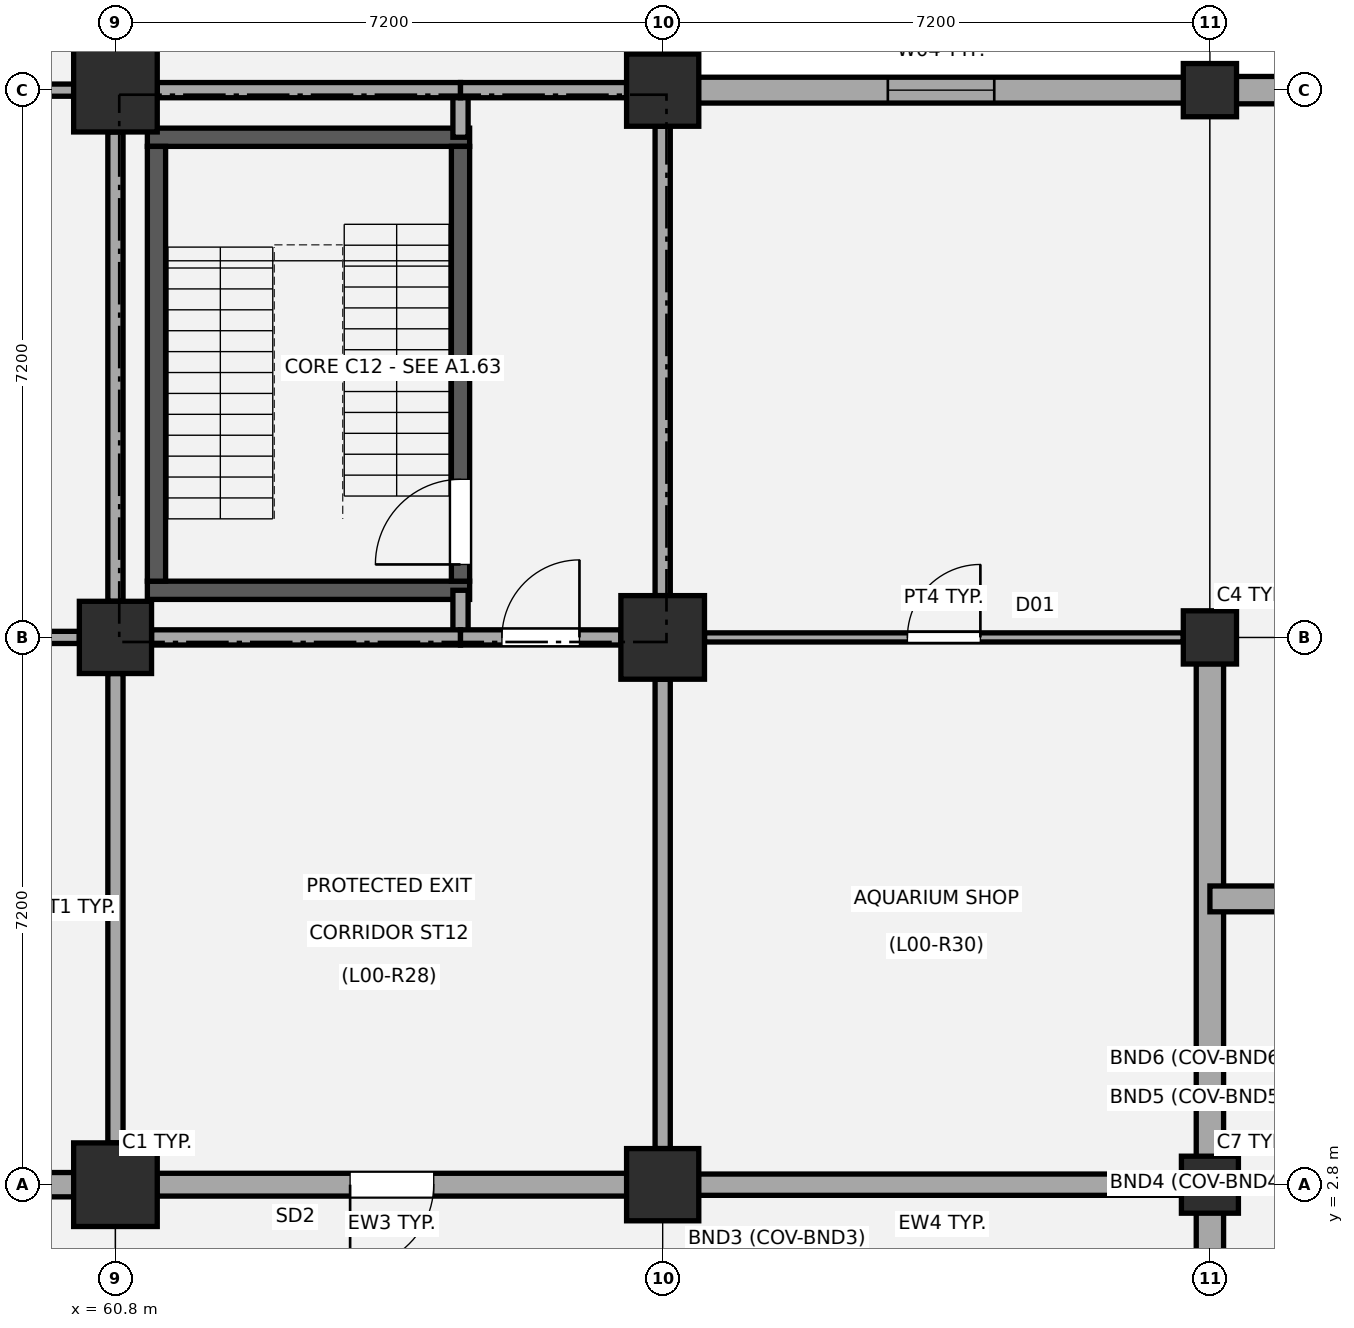
"""IFC4 building model, lengths in metres.
Left out: names, types, materials, properties, quantities, classifications, styles, units other than length and angle.
Written with IfcOpenShell. Run it as: python <this file> out.ifc"""

import sys

from ifc_helpers import new_model, si_unit, direction, frame, frame_2d, origin, origin_2d, place, context, subcontext, project, spatial, rectangle, circle, extrude, element, fill, save


model = new_model("IFC4")
c1 = context("Model", 3, precision=1e-05, world=origin(), true_north=direction((0.0, 1.0)))
c2 = subcontext(c1, "Body", "Model", "MODEL_VIEW")
j1 = project(units=[si_unit("LENGTHUNIT", "METRE"), si_unit("PLANEANGLEUNIT", "RADIAN")], contexts=[c1])
p1 = place(None, origin())
s1 = spatial("IfcSite", under=j1, at=p1, CompositionType="ELEMENT")
p2 = place(p1, origin())
s2 = spatial("IfcBuilding", under=s1, at=p2, CompositionType="ELEMENT")
p3 = place(p2, origin())
s3 = spatial("IfcBuildingStorey", under=s2, at=p3, CompositionType="ELEMENT", Elevation=0.0)
p4 = place(p3, frame((60.8, 2.8, -0.35), z_axis=(0.0, 0.0, 1.0), x_axis=(1.0, 0.0, 0.0)))
e1 = element("IfcColumn", 1, at=p4, inside=s3, PredefinedType="COLUMN", context=c2, shape_type="SweptSolid", body=[
    extrude(rectangle(XDim=1.1, YDim=1.1, at=origin_2d()), origin(), (0.0, 0.0, 1.0), 5.03),
])
p5 = place(p3, frame((60.8, 10.0, -0.35), z_axis=(0.0, 0.0, 1.0), x_axis=(1.0, 0.0, 0.0)))
e2 = element("IfcColumn", 2, at=p5, inside=s3, PredefinedType="COLUMN", context=c2, shape_type="SweptSolid", body=[
    extrude(rectangle(XDim=0.95, YDim=0.95, at=origin_2d()), origin(), (0.0, 0.0, 1.0), 5.03),
])
p6 = place(p3, frame((60.8, 17.2, -0.35), z_axis=(0.0, 0.0, 1.0), x_axis=(1.0, 0.0, 0.0)))
e3 = element("IfcColumn", 3, at=p6, inside=s3, PredefinedType="COLUMN", context=c2, shape_type="SweptSolid", body=[
    extrude(rectangle(XDim=1.1, YDim=1.1, at=origin_2d()), origin(), (0.0, 0.0, 1.0), 5.03),
])
p7 = place(p3, frame((68.0, 2.8, -0.35), z_axis=(0.0, 0.0, 1.0), x_axis=(1.0, 0.0, 0.0)))
e4 = element("IfcColumn", 4, at=p7, inside=s3, PredefinedType="COLUMN", context=c2, shape_type="SweptSolid", body=[
    extrude(rectangle(XDim=0.95, YDim=0.95, at=origin_2d()), origin(), (0.0, 0.0, 1.0), 5.03),
])
p8 = place(p3, frame((68.0, 10.0, -0.35), z_axis=(0.0, 0.0, 1.0), x_axis=(1.0, 0.0, 0.0)))
e5 = element("IfcColumn", 5, at=p8, inside=s3, PredefinedType="COLUMN", context=c2, shape_type="SweptSolid", body=[
    extrude(rectangle(XDim=1.1, YDim=1.1, at=origin_2d()), origin(), (0.0, 0.0, 1.0), 5.03),
])
p9 = place(p3, frame((68.0, 17.2, -0.35), z_axis=(0.0, 0.0, 1.0), x_axis=(1.0, 0.0, 0.0)))
e6 = element("IfcColumn", 6, at=p9, inside=s3, PredefinedType="COLUMN", context=c2, shape_type="SweptSolid", body=[
    extrude(rectangle(XDim=0.95, YDim=0.95, at=origin_2d()), origin(), (0.0, 0.0, 1.0), 5.03),
])
p10 = place(p3, frame((75.2, 2.8, -0.35), z_axis=(0.0, 0.0, 1.0), x_axis=(1.0, 0.0, 0.0)))
e7 = element("IfcColumn", 7, at=p10, inside=s3, PredefinedType="COLUMN", context=c2, shape_type="SweptSolid", body=[
    extrude(circle(Radius=0.375, at=origin_2d()), origin(), (0.0, 0.0, 1.0), 5.03),
])
for number, where, z_axis, x_axis in (
    (8, (75.2, 10.0, -0.35), (0.0, 0.0, 1.0), (1.0, 0.0, 0.0)),
    (9, (75.2, 17.2, -0.35), (0.0, 0.0, 1.0), (1.0, 0.0, 0.0)),
):
    element("IfcColumn", number, at=place(p3, frame(where, z_axis=z_axis, x_axis=x_axis)), inside=s3, PredefinedType="COLUMN", context=c2, shape_type="SweptSolid", body=[
        extrude(rectangle(XDim=0.7, YDim=0.7, at=origin_2d()), origin(), (0.0, 0.0, 1.0), 5.03),
    ])
p11 = place(p3, frame((60.255, 2.8, 0.0), z_axis=(0.0, 0.0, 1.0), x_axis=(-1.0, 0.0, 0.0)))
e10 = element("IfcWall", 10, at=p11, inside=s3, PredefinedType="STANDARD", context=c2, shape_type="SweptSolid", body=[
    extrude(rectangle(XDim=6.185, YDim=0.32, at=frame_2d((3.092, 0.0))), origin(), (0.0, 0.0, 1.0), 2.47),
])
p12 = place(p3, frame((67.53, 2.8, 0.0), z_axis=(0.0, 0.0, 1.0), x_axis=(-1.0, 0.0, 0.0)))
e11 = element("IfcWall", 11, at=p12, inside=s3, PredefinedType="STANDARD", context=c2, shape_type="SweptSolid", body=[
    extrude(rectangle(XDim=6.185, YDim=0.3, at=frame_2d((3.093, 0.0))), origin(), (0.0, 0.0, 1.0), 2.37),
])
p13 = place(p12, frame((2.542, 0.0, 0.0)))
e12 = element("IfcOpeningElement", 12, at=p13, cuts=e11, PredefinedType="OPENING", context=c2, shape_type="SweptSolid", body=[
    extrude(rectangle(XDim=1.1, YDim=2.15, at=frame_2d((0.55, 1.075))), frame((0.0, 0.16, 0.0), z_axis=(0.0, -1.0, 0.0), x_axis=(1.0, 0.0, 0.0)), (0.0, 0.0, 1.0), 0.32),
])
p14 = place(p3, frame((74.89, 2.8, 0.0), z_axis=(0.0, 0.0, 1.0), x_axis=(-1.0, 0.0, 0.0)))
e13 = element("IfcWall", 13, at=p14, inside=s3, PredefinedType="STANDARD", context=c2, shape_type="SweptSolid", body=[
    extrude(rectangle(XDim=6.42, YDim=0.28, at=frame_2d((3.21, 0.0))), origin(), (0.0, 0.0, 1.0), 3.67),
])
p15 = place(p3, frame((68.47, 17.2, 0.0), z_axis=(0.0, 0.0, 1.0), x_axis=(1.0, 0.0, 0.0)))
e14 = element("IfcWall", 14, at=p15, inside=s3, PredefinedType="STANDARD", context=c2, shape_type="SweptSolid", body=[
    extrude(rectangle(XDim=6.385, YDim=0.34, at=frame_2d((3.192, 0.0))), origin(), (0.0, 0.0, 1.0), 3.67),
])
p16 = place(p15, frame((2.492, 0.0, 0.95)))
e15 = element("IfcOpeningElement", 15, at=p16, cuts=e14, PredefinedType="OPENING", context=c2, shape_type="SweptSolid", body=[
    extrude(rectangle(XDim=1.4, YDim=1.6, at=frame_2d((0.7, 0.8))), frame((0.0, 0.18, 0.0), z_axis=(0.0, -1.0, 0.0), x_axis=(1.0, 0.0, 0.0)), (0.0, 0.0, 1.0), 0.36),
])
p17 = place(p3, frame((75.545, 17.2, 0.0), z_axis=(0.0, 0.0, 1.0), x_axis=(1.0, 0.0, 0.0)))
e16 = element("IfcWall", 16, at=p17, inside=s3, PredefinedType="STANDARD", context=c2, shape_type="SweptSolid", body=[
    extrude(rectangle(XDim=6.51, YDim=0.36, at=frame_2d((3.255, 0.0))), origin(), (0.0, 0.0, 1.0), 3.67),
])
p18 = place(p17, frame((2.455, 0.0, 0.95)))
e17 = element("IfcOpeningElement", 17, at=p18, cuts=e16, PredefinedType="OPENING", context=c2, shape_type="SweptSolid", body=[
    extrude(rectangle(XDim=1.6, YDim=1.7, at=frame_2d((0.8, 0.85))), frame((0.0, 0.19, 0.0), z_axis=(0.0, -1.0, 0.0), x_axis=(1.0, 0.0, 0.0)), (0.0, 0.0, 1.0), 0.38),
])
p19 = place(p3, frame((68.0, 23.855, 0.0), z_axis=(0.0, 0.0, 1.0), x_axis=(0.0, -1.0, 0.0)))
e18 = element("IfcWall", 18, at=p19, inside=s3, PredefinedType="STANDARD", context=c2, shape_type="SweptSolid", body=[
    extrude(rectangle(XDim=6.185, YDim=0.34, at=frame_2d((3.093, 0.0))), origin(), (0.0, 0.0, 1.0), 2.47),
])
p20 = place(p3, frame((75.2, 1.56, 0.0), z_axis=(0.0, 0.0, 1.0), x_axis=(0.0, 1.0, 0.0)))
e19 = element("IfcWall", 19, at=p20, inside=s3, PredefinedType="STANDARD", context=c2, shape_type="SweptSolid", body=[
    extrude(rectangle(XDim=8.095, YDim=0.36, at=frame_2d((4.047, 0.0))), origin(), (0.0, 0.0, 1.0), 3.67),
])
p21 = place(p3, frame((75.2, 6.56, 0.0), z_axis=(0.0, 0.0, 1.0), x_axis=(1.0, 0.0, 0.0)))
e20 = element("IfcWall", 20, at=p21, inside=s3, PredefinedType="STANDARD", context=c2, shape_type="SweptSolid", body=[
    extrude(rectangle(XDim=1.4, YDim=0.34, at=frame_2d((0.7, 0.0))), origin(), (0.0, 0.0, 1.0), 8.87),
])
for number, where, z_axis, x_axis in (
    (21, (61.22, 10.62, 0.0), (0.0, 0.0, 1.0), (1.0, 0.0, 0.0)),
    (22, (61.22, 16.58, 0.0), (0.0, 0.0, 1.0), (1.0, 0.0, 0.0)),
):
    element("IfcWall", number, at=place(p3, frame(where, z_axis=z_axis, x_axis=x_axis)), inside=s3, PredefinedType="SHEAR", context=c2, shape_type="SweptSolid", body=[
        extrude(rectangle(XDim=4.24, YDim=0.24, at=frame_2d((2.12, 0.0))), origin(), (0.0, 0.0, 1.0), 3.48),
    ])
p22 = place(p3, frame((61.34, 10.74, 0.0), z_axis=(0.0, 0.0, 1.0), x_axis=(0.0, 1.0, 0.0)))
e23 = element("IfcWall", 23, at=p22, inside=s3, PredefinedType="SHEAR", context=c2, shape_type="SweptSolid", body=[
    extrude(rectangle(XDim=5.72, YDim=0.24, at=frame_2d((2.86, 0.0))), origin(), (0.0, 0.0, 1.0), 3.48),
])
p23 = place(p3, frame((65.34, 10.74, 0.0), z_axis=(0.0, 0.0, 1.0), x_axis=(0.0, 1.0, 0.0)))
e24 = element("IfcWall", 24, at=p23, inside=s3, PredefinedType="SHEAR", context=c2, shape_type="SweptSolid", body=[
    extrude(rectangle(XDim=5.72, YDim=0.24, at=frame_2d((2.86, 0.0))), origin(), (0.0, 0.0, 1.0), 3.48),
])
p24 = place(p23, frame((0.22, 0.0, 0.0)))
e25 = element("IfcOpeningElement", 25, at=p24, cuts=e24, PredefinedType="OPENING", context=c2, shape_type="SweptSolid", body=[
    extrude(rectangle(XDim=1.12, YDim=2.15, at=frame_2d((0.56, 1.075))), frame((0.0, 0.13, 0.0), z_axis=(0.0, -1.0, 0.0), x_axis=(1.0, 0.0, 0.0)), (0.0, 0.0, 1.0), 0.26),
])
p25 = place(p3, frame((65.34, 10.0, 0.0), z_axis=(0.0, 0.0, 1.0), x_axis=(0.0, 1.0, 0.0)))
e26 = element("IfcWall", 26, at=p25, inside=s3, PredefinedType="PARTITIONING", context=c2, shape_type="SweptSolid", body=[
    extrude(rectangle(XDim=0.62, YDim=0.2, at=frame_2d((0.31, 0.0))), origin(), (0.0, 0.0, 1.0), 2.37),
])
p26 = place(p3, frame((65.34, 16.58, 0.0), z_axis=(0.0, 0.0, 1.0), x_axis=(0.0, 1.0, 0.0)))
e27 = element("IfcWall", 27, at=p26, inside=s3, PredefinedType="PARTITIONING", context=c2, shape_type="SweptSolid", body=[
    extrude(rectangle(XDim=0.62, YDim=0.2, at=frame_2d((0.31, 0.0))), origin(), (0.0, 0.0, 1.0), 2.37),
])
p27 = place(p3, frame((60.8, 10.475, 0.0), z_axis=(0.0, 0.0, 1.0), x_axis=(0.0, 1.0, 0.0)))
e28 = element("IfcWall", 28, at=p27, inside=s3, PredefinedType="PARTITIONING", context=c2, shape_type="SweptSolid", body=[
    extrude(rectangle(XDim=6.175, YDim=0.2, at=frame_2d((3.087, 0.0))), origin(), (0.0, 0.0, 1.0), 2.47),
])
p28 = place(p3, frame((68.0, 10.55, 0.0), z_axis=(0.0, 0.0, 1.0), x_axis=(0.0, 1.0, 0.0)))
e29 = element("IfcWall", 29, at=p28, inside=s3, PredefinedType="PARTITIONING", context=c2, shape_type="SweptSolid", body=[
    extrude(rectangle(XDim=6.175, YDim=0.2, at=frame_2d((3.087, 0.0))), origin(), (0.0, 0.0, 1.0), 2.47),
])
p29 = place(p3, frame((61.275, 10.0, 0.0), z_axis=(0.0, 0.0, 1.0), x_axis=(1.0, 0.0, 0.0)))
e30 = element("IfcWall", 30, at=p29, inside=s3, PredefinedType="PARTITIONING", context=c2, shape_type="SweptSolid", body=[
    extrude(rectangle(XDim=4.065, YDim=0.2, at=frame_2d((2.033, 0.0))), origin(), (0.0, 0.0, 1.0), 2.37),
])
p30 = place(p3, frame((65.34, 10.0, 0.0), z_axis=(0.0, 0.0, 1.0), x_axis=(1.0, 0.0, 0.0)))
e31 = element("IfcWall", 31, at=p30, inside=s3, PredefinedType="PARTITIONING", context=c2, shape_type="SweptSolid", body=[
    extrude(rectangle(XDim=2.11, YDim=0.2, at=frame_2d((1.055, 0.0))), origin(), (0.0, 0.0, 1.0), 2.37),
])
p31 = place(p30, frame((0.545, 0.0, 0.0)))
e32 = element("IfcOpeningElement", 32, at=p31, cuts=e31, PredefinedType="OPENING", context=c2, shape_type="SweptSolid", body=[
    extrude(rectangle(XDim=1.02, YDim=2.15, at=frame_2d((0.51, 1.075))), frame((0.0, 0.11, 0.0), z_axis=(0.0, -1.0, 0.0), x_axis=(1.0, 0.0, 0.0)), (0.0, 0.0, 1.0), 0.22),
])
p32 = place(p3, frame((61.35, 17.2, 0.0), z_axis=(0.0, 0.0, 1.0), x_axis=(1.0, 0.0, 0.0)))
e33 = element("IfcWall", 33, at=p32, inside=s3, PredefinedType="PARTITIONING", context=c2, shape_type="SweptSolid", body=[
    extrude(rectangle(XDim=3.99, YDim=0.2, at=frame_2d((1.995, 0.0))), origin(), (0.0, 0.0, 1.0), 2.37),
])
p33 = place(p3, frame((65.34, 17.2, 0.0), z_axis=(0.0, 0.0, 1.0), x_axis=(1.0, 0.0, 0.0)))
e34 = element("IfcWall", 34, at=p33, inside=s3, PredefinedType="PARTITIONING", context=c2, shape_type="SweptSolid", body=[
    extrude(rectangle(XDim=2.185, YDim=0.2, at=frame_2d((1.092, 0.0))), origin(), (0.0, 0.0, 1.0), 2.37),
])
p34 = place(p3, frame((60.8, 3.35, 0.0), z_axis=(0.0, 0.0, 1.0), x_axis=(0.0, 1.0, 0.0)))
e35 = element("IfcWall", 35, at=p34, inside=s3, PredefinedType="PARTITIONING", context=c2, shape_type="SweptSolid", body=[
    extrude(rectangle(XDim=6.175, YDim=0.2, at=frame_2d((3.087, 0.0))), origin(), (0.0, 0.0, 1.0), 2.47),
])
for number, where, z_axis, x_axis in (
    (36, (54.15, 10.0, 0.0), (0.0, 0.0, 1.0), (1.0, 0.0, 0.0)),
    (37, (54.075, 17.2, 0.0), (0.0, 0.0, 1.0), (1.0, 0.0, 0.0)),
):
    element("IfcWall", number, at=place(p3, frame(where, z_axis=z_axis, x_axis=x_axis)), inside=s3, PredefinedType="PARTITIONING", context=c2, shape_type="SweptSolid", body=[
        extrude(rectangle(XDim=6.175, YDim=0.16, at=frame_2d((3.087, 0.0))), origin(), (0.0, 0.0, 1.0), 2.47),
    ])
p35 = place(p3, frame((68.0, 3.275, 0.0), z_axis=(0.0, 0.0, 1.0), x_axis=(0.0, 1.0, 0.0)))
e38 = element("IfcWall", 38, at=p35, inside=s3, PredefinedType="PARTITIONING", context=c2, shape_type="SweptSolid", body=[
    extrude(rectangle(XDim=6.175, YDim=0.2, at=frame_2d((3.087, 0.0))), origin(), (0.0, 0.0, 1.0), 2.47),
])
p36 = place(p3, frame((68.55, 10.0, 0.0), z_axis=(0.0, 0.0, 1.0), x_axis=(1.0, 0.0, 0.0)))
e39 = element("IfcWall", 39, at=p36, inside=s3, PredefinedType="PARTITIONING", context=c2, shape_type="SweptSolid", body=[
    extrude(rectangle(XDim=6.3, YDim=0.12, at=frame_2d((3.15, 0.0))), origin(), (0.0, 0.0, 1.0), 3.52),
])
p37 = place(p36, frame((2.67, 0.0, 0.0)))
e40 = element("IfcOpeningElement", 40, at=p37, cuts=e39, PredefinedType="OPENING", context=c2, shape_type="SweptSolid", body=[
    extrude(rectangle(XDim=0.96, YDim=2.1, at=frame_2d((0.48, 1.05))), frame((0.0, 0.07, 0.0), z_axis=(0.0, -1.0, 0.0), x_axis=(1.0, 0.0, 0.0)), (0.0, 0.0, 1.0), 0.14),
])
p38 = place(p13, origin())
e41 = element("IfcDoor", 41, at=p38, inside=s3, OperationType="SINGLE_SWING_RIGHT", PredefinedType="DOOR", context=c2, shape_type="SweptSolid", body=[
    extrude(rectangle(XDim=1.1, YDim=2.15, at=frame_2d((0.55, 1.075))), frame((0.0, 0.025, 0.0), z_axis=(0.0, -1.0, 0.0), x_axis=(1.0, 0.0, 0.0)), (0.0, 0.0, 1.0), 0.05),
])
fill(e12, e41)
p39 = place(p16, origin())
e42 = element("IfcWindow", 42, at=p39, inside=s3, PartitioningType="SINGLE_PANEL", PredefinedType="WINDOW", context=c2, shape_type="SweptSolid", body=[
    extrude(rectangle(XDim=1.4, YDim=1.6, at=frame_2d((0.7, 0.8))), frame((0.0, 0.03, 0.0), z_axis=(0.0, -1.0, 0.0), x_axis=(1.0, 0.0, 0.0)), (0.0, 0.0, 1.0), 0.06),
])
fill(e15, e42)
p40 = place(p24, origin())
e43 = element("IfcDoor", 43, at=p40, inside=s3, OperationType="SINGLE_SWING_LEFT", PredefinedType="DOOR", context=c2, shape_type="SweptSolid", body=[
    extrude(rectangle(XDim=1.12, YDim=2.15, at=frame_2d((0.56, 1.075))), frame((0.0, 0.025, 0.0), z_axis=(0.0, -1.0, 0.0), x_axis=(1.0, 0.0, 0.0)), (0.0, 0.0, 1.0), 0.05),
])
fill(e25, e43)
p41 = place(p31, origin())
e44 = element("IfcDoor", 44, at=p41, inside=s3, OperationType="SINGLE_SWING_RIGHT", PredefinedType="DOOR", context=c2, shape_type="SweptSolid", body=[
    extrude(rectangle(XDim=1.02, YDim=2.15, at=frame_2d((0.51, 1.075))), frame((0.0, 0.025, 0.0), z_axis=(0.0, -1.0, 0.0), x_axis=(1.0, 0.0, 0.0)), (0.0, 0.0, 1.0), 0.05),
])
fill(e32, e44)
p42 = place(p37, origin())
e45 = element("IfcDoor", 45, at=p42, inside=s3, OperationType="SINGLE_SWING_RIGHT", PredefinedType="DOOR", context=c2, shape_type="SweptSolid", body=[
    extrude(rectangle(XDim=0.96, YDim=2.1, at=frame_2d((0.48, 1.05))), frame((0.0, 0.025, 0.0), z_axis=(0.0, -1.0, 0.0), x_axis=(1.0, 0.0, 0.0)), (0.0, 0.0, 1.0), 0.05),
])
fill(e40, e45)
save(model, sys.argv[1])
